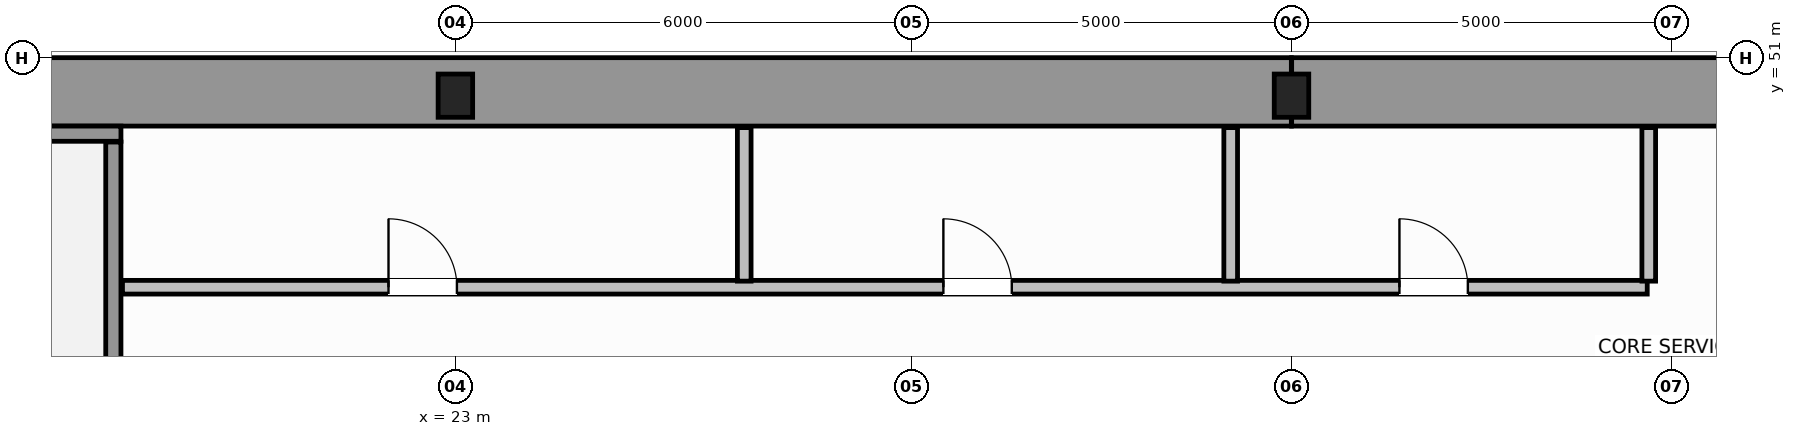
"""IFC4 building model, lengths in metres.
Left out: names, types, materials, properties, quantities, classifications, styles, units other than length and angle.
Written with IfcOpenShell. Run it as: python <this file> out.ifc"""

import sys

from ifc_helpers import new_model, si_unit, direction, frame, frame_2d, origin, origin_2d, place, context, subcontext, project, spatial, rectangle, i_section, extrude, source, transform, mapped, element, fill, save


model = new_model("IFC4")
c1 = context("Model", 3, precision=1e-05, world=origin(), true_north=direction((0.0, 1.0)))
c2 = subcontext(c1, "Body", "Model", "MODEL_VIEW")
j1 = project(units=[si_unit("LENGTHUNIT", "METRE"), si_unit("PLANEANGLEUNIT", "RADIAN")], contexts=[c1])
p1 = place(None, origin())
s1 = spatial("IfcSite", under=j1, at=p1, CompositionType="ELEMENT")
p2 = place(p1, origin())
s2 = spatial("IfcBuilding", under=s1, at=p2, CompositionType="ELEMENT")
p3 = place(p2, frame((0.0, 0.0, 10.0)))
s3 = spatial("IfcBuildingStorey", under=s2, at=p3, CompositionType="ELEMENT", Elevation=10.0)
m1 = source(origin(), c2, "Body", "SweptSolid", [
    extrude(i_section(OverallWidth=0.454, OverallDepth=0.569, WebThickness=0.078, FlangeThickness=0.08, FilletRadius=0.015, at=origin_2d()), origin(), (0.0, 0.0, 1.0), 4.4),
])
for number, where, z_axis, x_axis in (
    (1, (23.0, 50.5, 0.0), (0.0, 0.0, 1.0), (1.0, 0.0, 0.0)),
    (2, (34.0, 50.5, 0.0), (0.0, 0.0, 1.0), (1.0, 0.0, 0.0)),
):
    element("IfcColumn", number, at=place(p3, frame(where, z_axis=z_axis, x_axis=x_axis)), inside=s3, PredefinedType="COLUMN", context=c2, shape_type="MappedRepresentation", body=[
        mapped(m1, transform((0.0, 0.0, 0.0), scale=1.0)),
    ])
for number, where, z_axis, x_axis in (
    (3, (14.454, 50.55, 0.0), (0.0, 0.0, 1.0), (1.0, 0.0, 0.0)),
    (4, (34.002, 50.55, 0.0), (0.0, 0.0, 1.0), (1.0, 0.0, 0.0)),
):
    element("IfcWall", number, at=place(p3, frame(where, z_axis=z_axis, x_axis=x_axis)), inside=s3, PredefinedType="SHEAR", context=c2, shape_type="SweptSolid", body=[
        extrude(rectangle(XDim=19.544, YDim=0.9, at=frame_2d((9.772, 0.0))), origin(), (0.0, 0.0, 1.0), 4.4),
    ])
p4 = place(p3, frame((14.45, 50.0, 0.0), z_axis=(0.0, 0.0, 1.0), x_axis=(1.0, 0.0, 0.0)))
e5 = element("IfcWall", 5, at=p4, inside=s3, PredefinedType="SOLIDWALL", context=c2, shape_type="SweptSolid", body=[
    extrude(rectangle(XDim=4.15, YDim=0.2, at=frame_2d((2.075, 0.0))), origin(), (0.0, 0.0, 1.0), 4.4),
])
p5 = place(p3, frame((18.5, 39.96, 0.0), z_axis=(0.0, 0.0, 1.0), x_axis=(0.0, 1.0, 0.0)))
e6 = element("IfcWall", 6, at=p5, inside=s3, PredefinedType="SOLIDWALL", context=c2, shape_type="SweptSolid", body=[
    extrude(rectangle(XDim=9.93, YDim=0.2, at=frame_2d((4.965, 0.0))), origin(), (0.0, 0.0, 1.0), 4.4),
])
p6 = place(p3, frame((18.62, 47.98, 0.0), z_axis=(0.0, 0.0, 1.0), x_axis=(1.0, 0.0, 0.0)))
e7 = element("IfcWall", 7, at=p6, inside=s3, PredefinedType="PLUMBINGWALL", context=c2, shape_type="SweptSolid", body=[
    extrude(rectangle(XDim=20.06, YDim=0.18, at=frame_2d((10.03, 0.0))), origin(), (0.0, 0.0, 1.0), 4.12),
])
p7 = place(p6, frame((3.5, 0.0, 0.0)))
e8 = element("IfcOpeningElement", 8, at=p7, cuts=e7, PredefinedType="OPENING", context=c2, shape_type="SweptSolid", body=[
    extrude(rectangle(XDim=0.9, YDim=2.15, at=frame_2d((0.45, 1.075))), frame((0.0, 0.1, 0.0), z_axis=(0.0, -1.0, 0.0), x_axis=(1.0, 0.0, 0.0)), (0.0, 0.0, 1.0), 0.2),
])
p8 = place(p6, frame((10.8, 0.0, 0.0)))
e9 = element("IfcOpeningElement", 9, at=p8, cuts=e7, PredefinedType="OPENING", context=c2, shape_type="SweptSolid", body=[
    extrude(rectangle(XDim=0.9, YDim=2.15, at=frame_2d((0.45, 1.075))), frame((0.0, 0.1, 0.0), z_axis=(0.0, -1.0, 0.0), x_axis=(1.0, 0.0, 0.0)), (0.0, 0.0, 1.0), 0.2),
])
p9 = place(p6, frame((16.8, 0.0, 0.0)))
e10 = element("IfcOpeningElement", 10, at=p9, cuts=e7, PredefinedType="OPENING", context=c2, shape_type="SweptSolid", body=[
    extrude(rectangle(XDim=0.9, YDim=2.15, at=frame_2d((0.45, 1.075))), frame((0.0, 0.1, 0.0), z_axis=(0.0, -1.0, 0.0), x_axis=(1.0, 0.0, 0.0)), (0.0, 0.0, 1.0), 0.2),
])
for number, where, z_axis, x_axis in (
    (11, (26.8, 48.06, 0.0), (0.0, 0.0, 1.0), (0.0, 1.0, 0.0)),
    (12, (33.2, 48.06, 0.0), (0.0, 0.0, 1.0), (0.0, 1.0, 0.0)),
    (13, (38.7, 48.06, 0.0), (0.0, 0.0, 1.0), (0.0, 1.0, 0.0)),
):
    element("IfcWall", number, at=place(p3, frame(where, z_axis=z_axis, x_axis=x_axis)), inside=s3, PredefinedType="PLUMBINGWALL", context=c2, shape_type="SweptSolid", body=[
        extrude(rectangle(XDim=2.02, YDim=0.18, at=frame_2d((1.01, 0.0))), origin(), (0.0, 0.0, 1.0), 4.12),
    ])
m2 = source(origin(), c2, "Body", "SweptSolid", [
    extrude(rectangle(XDim=0.9, YDim=2.15, at=frame_2d((0.45, 1.075))), frame((0.0, 0.025, 0.0), z_axis=(0.0, -1.0, 0.0), x_axis=(1.0, 0.0, 0.0)), (0.0, 0.0, 1.0), 0.05),
])
p10 = place(p7, origin())
e14 = element("IfcDoor", 14, at=p10, inside=s3, OperationType="SINGLE_SWING_LEFT", PredefinedType="DOOR", context=c2, shape_type="MappedRepresentation", body=[
    mapped(m2, transform((0.0, 0.0, 0.0), scale=1.0)),
])
fill(e8, e14)
p11 = place(p8, origin())
e15 = element("IfcDoor", 15, at=p11, inside=s3, OperationType="SINGLE_SWING_RIGHT", PredefinedType="DOOR", context=c2, shape_type="MappedRepresentation", body=[
    mapped(m2, transform((0.0, 0.0, 0.0), scale=1.0)),
])
fill(e9, e15)
p12 = place(p9, origin())
e16 = element("IfcDoor", 16, at=p12, inside=s3, OperationType="SINGLE_SWING_LEFT", PredefinedType="DOOR", context=c2, shape_type="MappedRepresentation", body=[
    mapped(m2, transform((0.0, 0.0, 0.0), scale=1.0)),
])
fill(e10, e16)
save(model, sys.argv[1])
